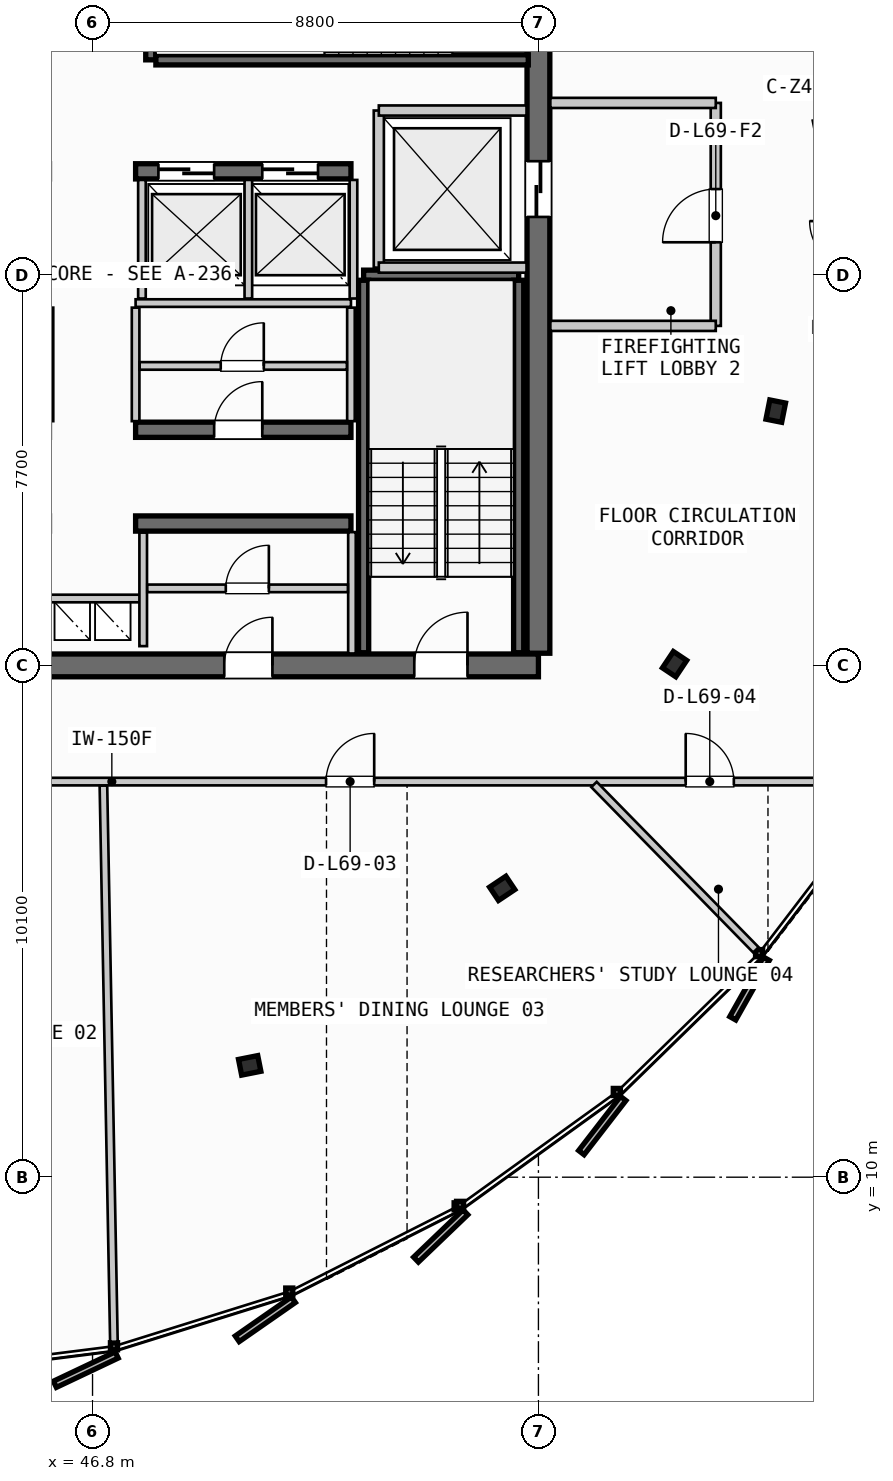
"""IFC4 building model, lengths in metres.
Left out: names, types, materials, properties, quantities, classifications, styles, units other than length and angle.
Written with IfcOpenShell. Run it as: python <this file> out.ifc"""

import sys

from ifc_helpers import new_model, si_unit, direction, frame, frame_2d, origin, origin_2d, place, context, subcontext, project, spatial, rectangle, i_section, extrude, source, transform, mapped, element, fill, save


model = new_model("IFC4")
c1 = context("Model", 3, precision=1e-05, world=origin(), true_north=direction((0.0, 1.0)))
c2 = subcontext(c1, "Body", "Model", "MODEL_VIEW")
j1 = project(units=[si_unit("LENGTHUNIT", "METRE"), si_unit("PLANEANGLEUNIT", "RADIAN")], contexts=[c1])
p1 = place(None, origin())
s1 = spatial("IfcSite", under=j1, at=p1, CompositionType="ELEMENT")
p2 = place(p1, origin())
s2 = spatial("IfcBuilding", under=s1, at=p2, CompositionType="ELEMENT")
p3 = place(p2, frame((0.0, 0.0, 262.9)))
s3 = spatial("IfcBuildingStorey", under=s2, at=p3, CompositionType="ELEMENT", Elevation=262.9)
p4 = place(p3, frame((38.0, 20.1, 0.0), z_axis=(0.0, 0.0, 1.0), x_axis=(1.0, 0.0, 0.0)))
e1 = element("IfcWall", 1, at=p4, inside=s3, PredefinedType="SHEAR", context=c2, shape_type="SweptSolid", body=[
    extrude(rectangle(XDim=17.6, YDim=0.45, at=frame_2d((8.8, 0.0))), origin(), (0.0, 0.0, 1.0), 3.21),
])
p5 = place(p4, frame((1.4, 0.0, 0.0)))
e2 = element("IfcOpeningElement", 2, at=p5, cuts=e1, PredefinedType="OPENING", context=c2, shape_type="SweptSolid", body=[
    extrude(rectangle(XDim=1.05, YDim=2.15, at=frame_2d((0.525, 1.075))), frame((0.0, 0.235, 0.0), z_axis=(0.0, -1.0, 0.0), x_axis=(1.0, 0.0, 0.0)), (0.0, 0.0, 1.0), 0.47),
])
p6 = place(p4, frame((15.15, 0.0, 0.0)))
e3 = element("IfcOpeningElement", 3, at=p6, cuts=e1, PredefinedType="OPENING", context=c2, shape_type="SweptSolid", body=[
    extrude(rectangle(XDim=1.05, YDim=2.15, at=frame_2d((0.525, 1.075))), frame((0.0, 0.235, 0.0), z_axis=(0.0, -1.0, 0.0), x_axis=(1.0, 0.0, 0.0)), (0.0, 0.0, 1.0), 0.47),
])
p7 = place(p4, frame((5.25, 0.0, 0.0)))
e4 = element("IfcOpeningElement", 4, at=p7, cuts=e1, PredefinedType="OPENING", context=c2, shape_type="SweptSolid", body=[
    extrude(rectangle(XDim=0.9, YDim=2.15, at=frame_2d((0.45, 1.075))), frame((0.0, 0.235, 0.0), z_axis=(0.0, -1.0, 0.0), x_axis=(1.0, 0.0, 0.0)), (0.0, 0.0, 1.0), 0.47),
])
p8 = place(p4, frame((11.4, 0.0, 0.0)))
e5 = element("IfcOpeningElement", 5, at=p8, cuts=e1, PredefinedType="OPENING", context=c2, shape_type="SweptSolid", body=[
    extrude(rectangle(XDim=0.95, YDim=2.15, at=frame_2d((0.475, 1.075))), frame((0.0, 0.235, 0.0), z_axis=(0.0, -1.0, 0.0), x_axis=(1.0, 0.0, 0.0)), (0.0, 0.0, 1.0), 0.47),
])
p9 = place(p3, frame((55.6, 20.34, 0.0), z_axis=(0.0, 0.0, 1.0), x_axis=(0.0, 1.0, 0.0)))
e6 = element("IfcWall", 6, at=p9, inside=s3, PredefinedType="SHEAR", context=c2, shape_type="SweptSolid", body=[
    extrude(rectangle(XDim=14.92, YDim=0.45, at=frame_2d((7.46, 0.0))), origin(), (0.0, 0.0, 1.0), 3.21),
])
p10 = place(p9, frame((12.71, 0.0, 0.0)))
e7 = element("IfcOpeningElement", 7, at=p10, cuts=e6, PredefinedType="OPENING", context=c2, shape_type="SweptSolid", body=[
    extrude(rectangle(XDim=1.05, YDim=2.15, at=frame_2d((0.525, 1.075))), frame((0.0, 0.235, 0.0), z_axis=(0.0, -1.0, 0.0), x_axis=(1.0, 0.0, 0.0)), (0.0, 0.0, 1.0), 0.47),
])
p11 = place(p9, frame((8.61, 0.0, 0.0)))
e8 = element("IfcOpeningElement", 8, at=p11, cuts=e6, PredefinedType="OPENING", context=c2, shape_type="SweptSolid", body=[
    extrude(rectangle(XDim=1.1, YDim=2.2, at=frame_2d((0.55, 1.1))), frame((0.0, 0.235, 0.0), z_axis=(0.0, -1.0, 0.0), x_axis=(1.0, 0.0, 0.0)), (0.0, 0.0, 1.0), 0.47),
])
p12 = place(p3, frame((47.65, 22.9, 0.0), z_axis=(0.0, 0.0, 1.0), x_axis=(1.0, 0.0, 0.0)))
e9 = element("IfcWall", 9, at=p12, inside=s3, PredefinedType="SHEAR", context=c2, shape_type="SweptSolid", body=[
    extrude(rectangle(XDim=4.25, YDim=0.3, at=frame_2d((2.125, 0.0))), origin(), (0.0, 0.0, 1.0), 3.21),
])
p13 = place(p3, frame((47.65, 24.75, 0.0), z_axis=(0.0, 0.0, 1.0), x_axis=(1.0, 0.0, 0.0)))
e10 = element("IfcWall", 10, at=p13, inside=s3, PredefinedType="SHEAR", context=c2, shape_type="SweptSolid", body=[
    extrude(rectangle(XDim=4.25, YDim=0.3, at=frame_2d((2.125, 0.0))), origin(), (0.0, 0.0, 1.0), 3.21),
])
p14 = place(p13, frame((1.55, 0.0, 0.0)))
e11 = element("IfcOpeningElement", 11, at=p14, cuts=e10, PredefinedType="OPENING", context=c2, shape_type="SweptSolid", body=[
    extrude(rectangle(XDim=0.95, YDim=2.15, at=frame_2d((0.475, 1.075))), frame((0.0, 0.16, 0.0), z_axis=(0.0, -1.0, 0.0), x_axis=(1.0, 0.0, 0.0)), (0.0, 0.0, 1.0), 0.32),
])
p15 = place(p3, frame((47.65, 29.85, 0.0), z_axis=(0.0, 0.0, 1.0), x_axis=(1.0, 0.0, 0.0)))
e12 = element("IfcWall", 12, at=p15, inside=s3, PredefinedType="SHEAR", context=c2, shape_type="SweptSolid", body=[
    extrude(rectangle(XDim=4.25, YDim=0.3, at=frame_2d((2.125, 0.0))), origin(), (0.0, 0.0, 1.0), 3.21),
])
p16 = place(p15, frame((0.45, 0.0, 0.0)))
e13 = element("IfcOpeningElement", 13, at=p16, cuts=e12, PredefinedType="OPENING", context=c2, shape_type="SweptSolid", body=[
    extrude(rectangle(XDim=1.1, YDim=2.2, at=frame_2d((0.55, 1.1))), frame((0.0, 0.16, 0.0), z_axis=(0.0, -1.0, 0.0), x_axis=(1.0, 0.0, 0.0)), (0.0, 0.0, 1.0), 0.32),
])
p17 = place(p15, frame((2.5, 0.0, 0.0)))
e14 = element("IfcOpeningElement", 14, at=p17, cuts=e12, PredefinedType="OPENING", context=c2, shape_type="SweptSolid", body=[
    extrude(rectangle(XDim=1.1, YDim=2.2, at=frame_2d((0.55, 1.1))), frame((0.0, 0.16, 0.0), z_axis=(0.0, -1.0, 0.0), x_axis=(1.0, 0.0, 0.0)), (0.0, 0.0, 1.0), 0.32),
])
m1 = source(origin(), c2, "Body", "SweptSolid", [
    extrude(i_section(OverallWidth=0.387, OverallDepth=0.316, WebThickness=0.019, FlangeThickness=0.028, FilletRadius=0.015, at=origin_2d()), origin(), (0.0, 0.0, 1.0), 3.21),
])
for number, where, z_axis, x_axis in (
    (15, (61.237, 30.672, 0.0), (0.0, 0.0, 1.0), (0.981, 0.195, 0.0)),
    (16, (49.902, 12.207, 0.0), (0.0, 0.0, 1.0), (0.195, -0.981, 0.0)),
    (17, (54.885, 15.7, 0.0), (0.0, 0.0, 1.0), (0.556, -0.831, 0.0)),
    (18, (58.287, 20.125, 0.0), (0.0, 0.0, 1.0), (0.831, -0.556, 0.0)),
    (19, (60.284, 25.118, 0.0), (0.0, 0.0, 1.0), (0.981, -0.195, 0.0)),
):
    element("IfcColumn", number, at=place(p3, frame(where, z_axis=z_axis, x_axis=x_axis)), inside=s3, PredefinedType="COLUMN", context=c2, shape_type="MappedRepresentation", body=[
        mapped(m1, transform((0.0, 0.0, 0.0), scale=1.0)),
    ])
p18 = place(p3, frame((52.15, 27.8, 0.0), z_axis=(0.0, 0.0, 1.0), x_axis=(1.0, 0.0, 0.0)))
e20 = element("IfcWall", 20, at=p18, inside=s3, PredefinedType="SHEAR", context=c2, shape_type="SweptSolid", body=[
    extrude(rectangle(XDim=3.06, YDim=0.2, at=frame_2d((1.53, 0.0))), origin(), (0.0, 0.0, 1.0), 3.21),
])
for number, where, z_axis, x_axis in (
    (21, (55.21, 27.7, 0.0), (0.0, 0.0, 1.0), (0.0, -1.0, 0.0)),
    (22, (52.15, 20.35, 0.0), (0.0, 0.0, 1.0), (0.0, 1.0, 0.0)),
):
    element("IfcWall", number, at=place(p3, frame(where, z_axis=z_axis, x_axis=x_axis)), inside=s3, PredefinedType="SHEAR", context=c2, shape_type="SweptSolid", body=[
        extrude(rectangle(XDim=7.35, YDim=0.2, at=frame_2d((3.675, 0.0))), origin(), (0.0, 0.0, 1.0), 3.21),
    ])
p19 = place(p3, frame((47.95, 32.05, 0.0), z_axis=(0.0, 0.0, 1.0), x_axis=(0.0, 1.0, 0.0)))
e23 = element("IfcWall", 23, at=p19, inside=s3, PredefinedType="SHEAR", context=c2, shape_type="SweptSolid", body=[
    extrude(rectangle(XDim=3.06, YDim=0.2, at=frame_2d((1.53, 0.0))), origin(), (0.0, 0.0, 1.0), 3.21),
])
p20 = place(p3, frame((55.4, 32.05, 0.0), z_axis=(0.0, 0.0, 1.0), x_axis=(-1.0, 0.0, 0.0)))
e24 = element("IfcWall", 24, at=p20, inside=s3, PredefinedType="SHEAR", context=c2, shape_type="SweptSolid", body=[
    extrude(rectangle(XDim=7.35, YDim=0.2, at=frame_2d((3.675, 0.0))), origin(), (0.0, 0.0, 1.0), 3.21),
])
p21 = place(p3, frame((45.8, 21.42, 0.0), z_axis=(0.0, 0.0, 1.0), x_axis=(1.0, 0.0, 0.0)))
e25 = element("IfcWall", 25, at=p21, inside=s3, PredefinedType="PARTITIONING", context=c2, shape_type="SweptSolid", body=[
    extrude(rectangle(XDim=2.0, YDim=0.15, at=frame_2d((1.0, 0.0))), origin(), (0.0, 0.0, 1.0), 2.735),
])
p22 = place(p3, frame((47.8, 20.48, 0.0), z_axis=(0.0, 0.0, 1.0), x_axis=(0.0, 1.0, 0.0)))
e26 = element("IfcWall", 26, at=p22, inside=s3, PredefinedType="PARTITIONING", context=c2, shape_type="SweptSolid", body=[
    extrude(rectangle(XDim=2.24, YDim=0.15, at=frame_2d((1.12, 0.0))), origin(), (0.0, 0.0, 1.0), 2.735),
])
p23 = place(p3, frame((52.45, 27.95, 0.0), z_axis=(0.0, 0.0, 1.0), x_axis=(0.0, 1.0, 0.0)))
e27 = element("IfcWall", 27, at=p23, inside=s3, PredefinedType="PARTITIONING", context=c2, shape_type="SweptSolid", body=[
    extrude(rectangle(XDim=3.1, YDim=0.2, at=frame_2d((1.55, 0.0))), origin(), (0.0, 0.0, 1.0), 2.735),
])
for number, where, z_axis, x_axis in (
    (28, (52.45, 27.95, 0.0), (0.0, 0.0, 1.0), (1.0, 0.0, 0.0)),
    (29, (52.45, 31.05, 0.0), (0.0, 0.0, 1.0), (1.0, 0.0, 0.0)),
):
    element("IfcWall", number, at=place(p3, frame(where, z_axis=z_axis, x_axis=x_axis)), inside=s3, PredefinedType="PARTITIONING", context=c2, shape_type="SweptSolid", body=[
        extrude(rectangle(XDim=2.915, YDim=0.2, at=frame_2d((1.458, 0.0))), origin(), (0.0, 0.0, 1.0), 2.735),
    ])
p24 = place(p3, frame((59.1, 26.8, 0.0), z_axis=(0.0, 0.0, 1.0), x_axis=(0.0, 1.0, 0.0)))
e30 = element("IfcWall", 30, at=p24, inside=s3, PredefinedType="PARTITIONING", context=c2, shape_type="SweptSolid", body=[
    extrude(rectangle(XDim=4.4, YDim=0.2, at=frame_2d((2.2, 0.0))), origin(), (0.0, 0.0, 1.0), 2.735),
])
p25 = place(p24, frame((1.65, 0.0, 0.0)))
e31 = element("IfcOpeningElement", 31, at=p25, cuts=e30, PredefinedType="OPENING", context=c2, shape_type="SweptSolid", body=[
    extrude(rectangle(XDim=1.05, YDim=2.15, at=frame_2d((0.525, 1.075))), frame((0.0, 0.11, 0.0), z_axis=(0.0, -1.0, 0.0), x_axis=(1.0, 0.0, 0.0)), (0.0, 0.0, 1.0), 0.22),
])
for number, where, z_axis, x_axis in (
    (32, (55.835, 26.8, 0.0), (0.0, 0.0, 1.0), (1.0, 0.0, 0.0)),
    (33, (55.835, 31.2, 0.0), (0.0, 0.0, 1.0), (1.0, 0.0, 0.0)),
):
    element("IfcWall", number, at=place(p3, frame(where, z_axis=z_axis, x_axis=x_axis)), inside=s3, PredefinedType="PARTITIONING", context=c2, shape_type="SweptSolid", body=[
        extrude(rectangle(XDim=3.265, YDim=0.2, at=frame_2d((1.633, 0.0))), origin(), (0.0, 0.0, 1.0), 2.735),
    ])
p26 = place(p3, frame((51.92, 20.335, 0.0), z_axis=(0.0, 0.0, 1.0), x_axis=(0.0, 1.0, 0.0)))
e34 = element("IfcWall", 34, at=p26, inside=s3, PredefinedType="PARTITIONING", context=c2, shape_type="SweptSolid", body=[
    extrude(rectangle(XDim=2.395, YDim=0.15, at=frame_2d((1.198, 0.0))), origin(), (0.0, 0.0, 1.0), 2.735),
])
p27 = place(p3, frame((47.88, 21.62, 0.0), z_axis=(0.0, 0.0, 1.0), x_axis=(1.0, 0.0, 0.0)))
e35 = element("IfcWall", 35, at=p27, inside=s3, PredefinedType="PARTITIONING", context=c2, shape_type="SweptSolid", body=[
    extrude(rectangle(XDim=3.96, YDim=0.15, at=frame_2d((1.98, 0.0))), origin(), (0.0, 0.0, 1.0), 2.735),
])
p28 = place(p27, frame((1.55, 0.0, 0.0)))
e36 = element("IfcOpeningElement", 36, at=p28, cuts=e35, PredefinedType="OPENING", context=c2, shape_type="SweptSolid", body=[
    extrude(rectangle(XDim=0.85, YDim=2.15, at=frame_2d((0.425, 1.075))), frame((0.0, 0.085, 0.0), z_axis=(0.0, -1.0, 0.0), x_axis=(1.0, 0.0, 0.0)), (0.0, 0.0, 1.0), 0.17),
])
p29 = place(p3, frame((47.65, 27.25, 0.0), z_axis=(0.0, 0.0, 1.0), x_axis=(1.0, 0.0, 0.0)))
e37 = element("IfcWall", 37, at=p29, inside=s3, PredefinedType="PARTITIONING", context=c2, shape_type="SweptSolid", body=[
    extrude(rectangle(XDim=4.25, YDim=0.15, at=frame_2d((2.125, 0.0))), origin(), (0.0, 0.0, 1.0), 2.735),
])
for number, where, z_axis, x_axis in (
    (38, (45.95, 24.92, 0.0), (0.0, 0.0, 1.0), (0.0, 1.0, 0.0)),
    (39, (47.65, 24.92, 0.0), (0.0, 0.0, 1.0), (0.0, 1.0, 0.0)),
    (40, (51.9, 24.92, 0.0), (0.0, 0.0, 1.0), (0.0, 1.0, 0.0)),
):
    element("IfcWall", number, at=place(p3, frame(where, z_axis=z_axis, x_axis=x_axis)), inside=s3, PredefinedType="PARTITIONING", context=c2, shape_type="SweptSolid", body=[
        extrude(rectangle(XDim=2.24, YDim=0.15, at=frame_2d((1.12, 0.0))), origin(), (0.0, 0.0, 1.0), 2.735),
    ])
p30 = place(p3, frame((47.73, 26.01, 0.0), z_axis=(0.0, 0.0, 1.0), x_axis=(1.0, 0.0, 0.0)))
e41 = element("IfcWall", 41, at=p30, inside=s3, PredefinedType="PARTITIONING", context=c2, shape_type="SweptSolid", body=[
    extrude(rectangle(XDim=4.09, YDim=0.15, at=frame_2d((2.045, 0.0))), origin(), (0.0, 0.0, 1.0), 2.735),
])
p31 = place(p30, frame((1.6, 0.0, 0.0)))
e42 = element("IfcOpeningElement", 42, at=p31, cuts=e41, PredefinedType="OPENING", context=c2, shape_type="SweptSolid", body=[
    extrude(rectangle(XDim=0.85, YDim=2.15, at=frame_2d((0.425, 1.075))), frame((0.0, 0.085, 0.0), z_axis=(0.0, -1.0, 0.0), x_axis=(1.0, 0.0, 0.0)), (0.0, 0.0, 1.0), 0.17),
])
for number, where, z_axis, x_axis in (
    (43, (47.775, 27.34, 0.0), (0.0, 0.0, 1.0), (0.0, 1.0, 0.0)),
    (44, (49.875, 27.34, 0.0), (0.0, 0.0, 1.0), (0.0, 1.0, 0.0)),
    (45, (51.95, 27.34, 0.0), (0.0, 0.0, 1.0), (0.0, 1.0, 0.0)),
):
    element("IfcWall", number, at=place(p3, frame(where, z_axis=z_axis, x_axis=x_axis)), inside=s3, PredefinedType="PARTITIONING", context=c2, shape_type="SweptSolid", body=[
        extrude(rectangle(XDim=2.34, YDim=0.15, at=frame_2d((1.17, 0.0))), origin(), (0.0, 0.0, 1.0), 2.735),
    ])
p32 = place(p3, frame((32.46, 17.807, 0.0), z_axis=(0.0, 0.0, 1.0), x_axis=(1.0, 0.0, 0.0)))
e46 = element("IfcWall", 46, at=p32, inside=s3, PredefinedType="PARTITIONING", context=c2, shape_type="SweptSolid", body=[
    extrude(rectangle(XDim=29.442, YDim=0.15, at=frame_2d((14.721, 0.0))), origin(), (0.0, 0.0, 1.0), 2.735),
])
p33 = place(p32, frame((5.57, 0.0, 0.0)))
e47 = element("IfcOpeningElement", 47, at=p33, cuts=e46, PredefinedType="OPENING", context=c2, shape_type="SweptSolid", body=[
    extrude(rectangle(XDim=0.95, YDim=2.15, at=frame_2d((0.475, 1.075))), frame((0.0, 0.085, 0.0), z_axis=(0.0, -1.0, 0.0), x_axis=(1.0, 0.0, 0.0)), (0.0, 0.0, 1.0), 0.17),
])
p34 = place(p32, frame((11.599, 0.0, 0.0)))
e48 = element("IfcOpeningElement", 48, at=p34, cuts=e46, PredefinedType="OPENING", context=c2, shape_type="SweptSolid", body=[
    extrude(rectangle(XDim=0.95, YDim=2.15, at=frame_2d((0.475, 1.075))), frame((0.0, 0.085, 0.0), z_axis=(0.0, -1.0, 0.0), x_axis=(1.0, 0.0, 0.0)), (0.0, 0.0, 1.0), 0.17),
])
p35 = place(p32, frame((18.949, 0.0, 0.0)))
e49 = element("IfcOpeningElement", 49, at=p35, cuts=e46, PredefinedType="OPENING", context=c2, shape_type="SweptSolid", body=[
    extrude(rectangle(XDim=0.95, YDim=2.15, at=frame_2d((0.475, 1.075))), frame((0.0, 0.085, 0.0), z_axis=(0.0, -1.0, 0.0), x_axis=(1.0, 0.0, 0.0)), (0.0, 0.0, 1.0), 0.17),
])
p36 = place(p32, frame((26.046, 0.0, 0.0)))
e50 = element("IfcOpeningElement", 50, at=p36, cuts=e46, PredefinedType="OPENING", context=c2, shape_type="SweptSolid", body=[
    extrude(rectangle(XDim=0.95, YDim=2.15, at=frame_2d((0.475, 1.075))), frame((0.0, 0.085, 0.0), z_axis=(0.0, -1.0, 0.0), x_axis=(1.0, 0.0, 0.0)), (0.0, 0.0, 1.0), 0.17),
])
p37 = place(p3, frame((47.015, 17.727, 0.0), z_axis=(0.0, 0.0, 1.0), x_axis=(0.018840233675, -0.999822507046, 0.0)))
e51 = element("IfcWall", 51, at=p37, inside=s3, PredefinedType="PARTITIONING", context=c2, shape_type="SweptSolid", body=[
    extrude(rectangle(XDim=10.976, YDim=0.15, at=frame_2d((5.488, 0.0))), origin(), (0.0, 0.0, 1.0), 2.735),
])
p38 = place(p3, frame((56.697, 17.75, 0.0), z_axis=(0.0, 0.0, 1.0), x_axis=(0.699583858336, -0.714550505672, 0.0)))
e52 = element("IfcWall", 52, at=p38, inside=s3, PredefinedType="PARTITIONING", context=c2, shape_type="SweptSolid", body=[
    extrude(rectangle(XDim=4.567, YDim=0.15, at=frame_2d((2.284, 0.0))), origin(), (0.0, 0.0, 1.0), 2.735),
])
m2 = source(origin(), c2, "Body", "SweptSolid", [
    extrude(rectangle(XDim=1.05, YDim=2.15, at=frame_2d((0.525, 1.075))), frame((0.0, 0.025, 0.0), z_axis=(0.0, -1.0, 0.0), x_axis=(1.0, 0.0, 0.0)), (0.0, 0.0, 1.0), 0.05),
])
p39 = place(p6, origin())
e53 = element("IfcDoor", 53, at=p39, inside=s3, OperationType="SINGLE_SWING_RIGHT", PredefinedType="DOOR", context=c2, shape_type="MappedRepresentation", body=[
    mapped(m2, transform((0.0, 0.0, 0.0), scale=1.0)),
])
fill(e3, e53)
m3 = source(origin(), c2, "Body", "SweptSolid", [
    extrude(rectangle(XDim=1.1, YDim=2.2, at=frame_2d((0.55, 1.1))), frame((0.0, 0.025, 0.0), z_axis=(0.0, -1.0, 0.0), x_axis=(1.0, 0.0, 0.0)), (0.0, 0.0, 1.0), 0.05),
])
p40 = place(p11, origin())
e54 = element("IfcDoor", 54, at=p40, inside=s3, OperationType="SLIDING_TO_RIGHT", PredefinedType="DOOR", context=c2, shape_type="MappedRepresentation", body=[
    mapped(m3, transform((0.0, 0.0, 0.0), scale=1.0)),
])
fill(e8, e54)
m4 = source(origin(), c2, "Body", "SweptSolid", [
    extrude(rectangle(XDim=0.95, YDim=2.15, at=frame_2d((0.475, 1.075))), frame((0.0, 0.025, 0.0), z_axis=(0.0, -1.0, 0.0), x_axis=(1.0, 0.0, 0.0)), (0.0, 0.0, 1.0), 0.05),
])
p41 = place(p8, origin())
e55 = element("IfcDoor", 55, at=p41, inside=s3, OperationType="SINGLE_SWING_RIGHT", PredefinedType="DOOR", context=c2, shape_type="MappedRepresentation", body=[
    mapped(m4, transform((0.0, 0.0, 0.0), scale=1.0)),
])
fill(e5, e55)
p42 = place(p14, origin())
e56 = element("IfcDoor", 56, at=p42, inside=s3, OperationType="SINGLE_SWING_RIGHT", PredefinedType="DOOR", context=c2, shape_type="MappedRepresentation", body=[
    mapped(m4, transform((0.0, 0.0, 0.0), scale=1.0)),
])
fill(e11, e56)
p43 = place(p16, origin())
e57 = element("IfcDoor", 57, at=p43, inside=s3, OperationType="SLIDING_TO_LEFT", PredefinedType="DOOR", context=c2, shape_type="MappedRepresentation", body=[
    mapped(m3, transform((0.0, 0.0, 0.0), scale=1.0)),
])
fill(e13, e57)
p44 = place(p17, origin())
e58 = element("IfcDoor", 58, at=p44, inside=s3, OperationType="SLIDING_TO_LEFT", PredefinedType="DOOR", context=c2, shape_type="MappedRepresentation", body=[
    mapped(m3, transform((0.0, 0.0, 0.0), scale=1.0)),
])
fill(e14, e58)
p45 = place(p25, origin())
e59 = element("IfcDoor", 59, at=p45, inside=s3, OperationType="SINGLE_SWING_LEFT", PredefinedType="DOOR", context=c2, shape_type="MappedRepresentation", body=[
    mapped(m2, transform((0.0, 0.0, 0.0), scale=1.0)),
])
fill(e31, e59)
m5 = source(origin(), c2, "Body", "SweptSolid", [
    extrude(rectangle(XDim=0.85, YDim=2.15, at=frame_2d((0.425, 1.075))), frame((0.0, 0.025, 0.0), z_axis=(0.0, -1.0, 0.0), x_axis=(1.0, 0.0, 0.0)), (0.0, 0.0, 1.0), 0.05),
])
p46 = place(p28, origin())
e60 = element("IfcDoor", 60, at=p46, inside=s3, OperationType="SINGLE_SWING_RIGHT", PredefinedType="DOOR", context=c2, shape_type="MappedRepresentation", body=[
    mapped(m5, transform((0.0, 0.0, 0.0), scale=1.0)),
])
fill(e36, e60)
p47 = place(p31, origin())
e61 = element("IfcDoor", 61, at=p47, inside=s3, OperationType="SINGLE_SWING_RIGHT", PredefinedType="DOOR", context=c2, shape_type="MappedRepresentation", body=[
    mapped(m5, transform((0.0, 0.0, 0.0), scale=1.0)),
])
fill(e42, e61)
p48 = place(p35, origin())
e62 = element("IfcDoor", 62, at=p48, inside=s3, OperationType="SINGLE_SWING_RIGHT", PredefinedType="DOOR", context=c2, shape_type="MappedRepresentation", body=[
    mapped(m4, transform((0.0, 0.0, 0.0), scale=1.0)),
])
fill(e49, e62)
p49 = place(p36, origin())
e63 = element("IfcDoor", 63, at=p49, inside=s3, OperationType="SINGLE_SWING_LEFT", PredefinedType="DOOR", context=c2, shape_type="MappedRepresentation", body=[
    mapped(m4, transform((0.0, 0.0, 0.0), scale=1.0)),
])
fill(e50, e63)
save(model, sys.argv[1])
